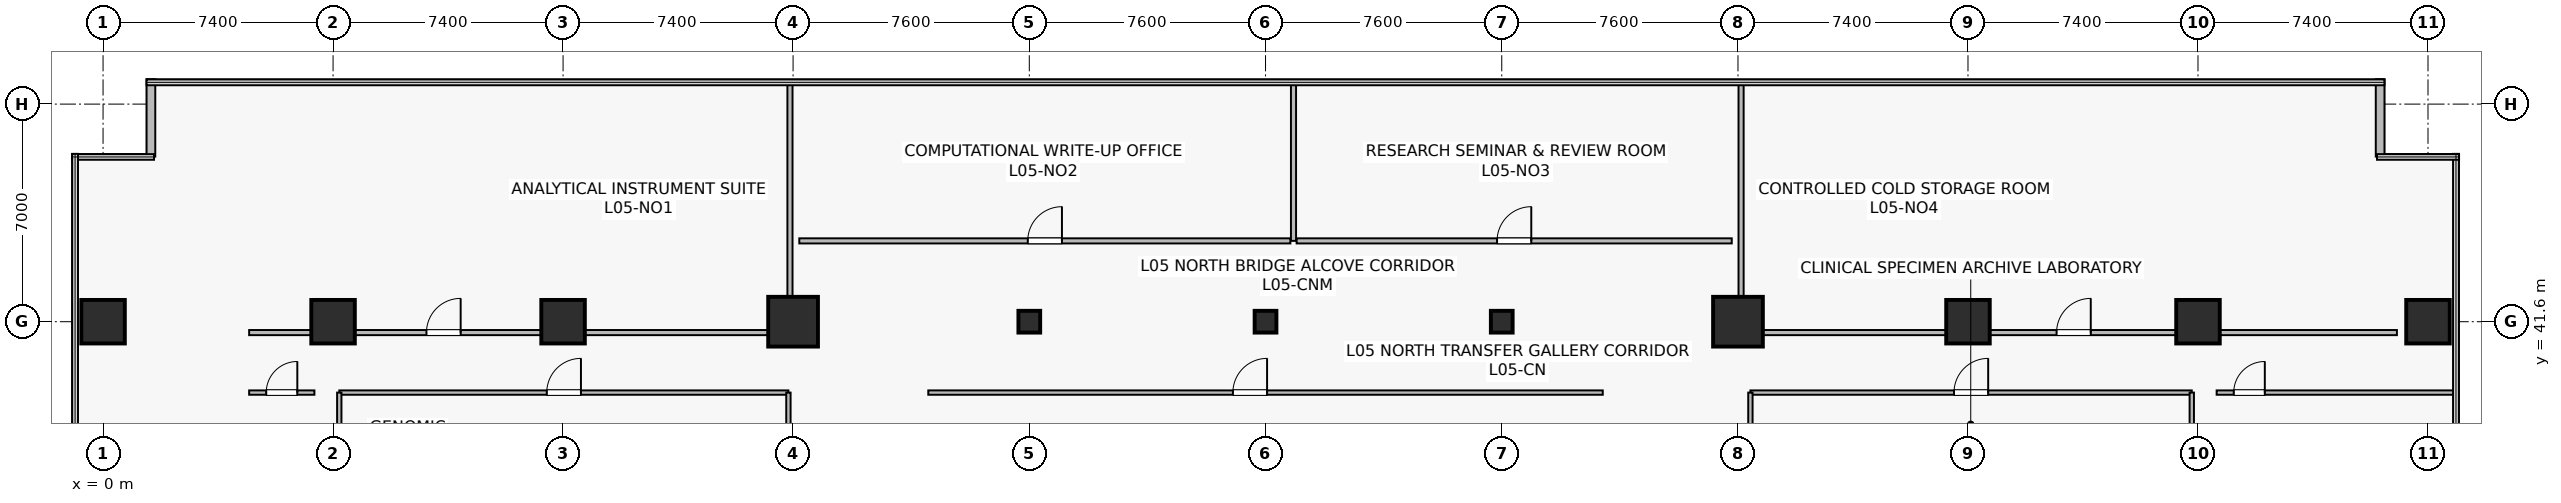
"""IFC4 building model, lengths in metres.
Left out: names, types, materials, properties, quantities, classifications, styles, units other than length and angle.
Written with IfcOpenShell. Run it as: python <this file> out.ifc"""

import sys

from ifc_helpers import new_model, si_unit, direction, frame, frame_2d, origin, origin_2d, place, context, subcontext, project, spatial, rectangle, hollow_rectangle, extrude, source, transform, mapped, element, fill, save


model = new_model("IFC4")
c1 = context("Model", 3, precision=1e-05, world=origin(), true_north=direction((0.0, 1.0)))
c2 = subcontext(c1, "Body", "Model", "MODEL_VIEW")
j1 = project(units=[si_unit("LENGTHUNIT", "METRE"), si_unit("PLANEANGLEUNIT", "RADIAN")], contexts=[c1])
p1 = place(None, origin())
s1 = spatial("IfcSite", under=j1, at=p1, CompositionType="ELEMENT")
p2 = place(p1, origin())
s2 = spatial("IfcBuilding", under=s1, at=p2, CompositionType="ELEMENT")
p3 = place(p2, frame((0.0, 0.0, 19.8)))
s3 = spatial("IfcBuildingStorey", under=s2, at=p3, CompositionType="ELEMENT", Elevation=19.8)
m1 = source(origin(), c2, "Body", "SweptSolid", [
    extrude(rectangle(XDim=1.4, YDim=1.4, at=origin_2d()), origin(), (0.0, 0.0, 1.0), 5.4),
])
p4 = place(p3, frame((14.8, 41.6, 0.0), z_axis=(0.0, 0.0, 1.0), x_axis=(1.0, 0.0, 0.0)))
e1 = element("IfcColumn", 1, at=p4, inside=s3, PredefinedType="COLUMN", context=c2, shape_type="MappedRepresentation", body=[
    mapped(m1, transform((0.0, 0.0, 0.0), scale=1.0)),
])
m2 = source(origin(), c2, "Body", "SweptSolid", [
    extrude(rectangle(XDim=1.6, YDim=1.6, at=origin_2d()), origin(), (0.0, 0.0, 1.0), 5.4),
])
for number, where, z_axis, x_axis in (
    (2, (22.2, 41.6, 0.0), (0.0, 0.0, 1.0), (1.0, 0.0, 0.0)),
    (3, (52.6, 41.6, 0.0), (0.0, 0.0, 1.0), (1.0, 0.0, 0.0)),
):
    element("IfcColumn", number, at=place(p3, frame(where, z_axis=z_axis, x_axis=x_axis)), inside=s3, PredefinedType="COLUMN", context=c2, shape_type="MappedRepresentation", body=[
        mapped(m2, transform((0.0, 0.0, 0.0), scale=1.0)),
    ])
for number, where, z_axis, x_axis in (
    (4, (60.0, 41.6, 0.0), (0.0, 0.0, 1.0), (1.0, 0.0, 0.0)),
    (5, (7.4, 41.6, 0.0), (0.0, 0.0, 1.0), (1.0, 0.0, 0.0)),
    (6, (67.4, 41.6, 0.0), (0.0, 0.0, 1.0), (1.0, 0.0, 0.0)),
    (7, (0.0, 41.6, 0.0), (0.0, 0.0, 1.0), (1.0, 0.0, 0.0)),
    (8, (74.8, 41.6, 0.0), (0.0, 0.0, 1.0), (1.0, 0.0, 0.0)),
):
    element("IfcColumn", number, at=place(p3, frame(where, z_axis=z_axis, x_axis=x_axis)), inside=s3, PredefinedType="COLUMN", context=c2, shape_type="MappedRepresentation", body=[
        mapped(m1, transform((0.0, 0.0, 0.0), scale=1.0)),
    ])
m3 = source(origin(), c2, "Body", "SweptSolid", [
    extrude(hollow_rectangle(XDim=0.7, YDim=0.7, WallThickness=0.032, at=origin_2d()), origin(), (0.0, 0.0, 1.0), 5.4),
])
for number, where, z_axis, x_axis in (
    (9, (29.8, 41.6, 0.0), (0.0, 0.0, 1.0), (1.0, 0.0, 0.0)),
    (10, (37.4, 41.6, 0.0), (0.0, 0.0, 1.0), (1.0, 0.0, 0.0)),
    (11, (45.0, 41.6, 0.0), (0.0, 0.0, 1.0), (1.0, 0.0, 0.0)),
):
    element("IfcColumn", number, at=place(p3, frame(where, z_axis=z_axis, x_axis=x_axis)), inside=s3, PredefinedType="COLUMN", context=c2, shape_type="MappedRepresentation", body=[
        mapped(m3, transform((0.0, 0.0, 0.0), scale=1.0)),
    ])
for number, where, z_axis, x_axis in (
    (12, (73.26, 46.912, 0.0), (0.0, 0.0, 1.0), (0.0, 1.0, 0.0)),
    (13, (1.54, 49.4, 0.0), (0.0, 0.0, 1.0), (0.0, -1.0, 0.0)),
):
    element("IfcWall", number, at=place(p3, frame(where, z_axis=z_axis, x_axis=x_axis)), inside=s3, PredefinedType="STANDARD", context=c2, shape_type="SweptSolid", body=[
        extrude(rectangle(XDim=2.488, YDim=0.28, at=frame_2d((1.244, 0.0))), origin(), (0.0, 0.0, 1.0), 5.08),
    ])
p5 = place(p3, frame((4.7, 41.25, 0.0), z_axis=(0.0, 0.0, 1.0), x_axis=(1.0, 0.0, 0.0)))
e14 = element("IfcWall", 14, at=p5, inside=s3, PredefinedType="PARTITIONING", context=c2, shape_type="SweptSolid", body=[
    extrude(rectangle(XDim=17.1, YDim=0.165, at=frame_2d((8.55, 0.0))), origin(), (0.0, 0.0, 1.0), 4.365),
])
p6 = place(p5, frame((5.705, 0.0, 0.0)))
e15 = element("IfcOpeningElement", 15, at=p6, cuts=e14, PredefinedType="OPENING", context=c2, shape_type="SweptSolid", body=[
    extrude(rectangle(XDim=1.1, YDim=2.18, at=frame_2d((0.55, 1.09))), frame((0.0, 0.093, 0.0), z_axis=(0.0, -1.0, 0.0), x_axis=(1.0, 0.0, 0.0)), (0.0, 0.0, 1.0), 0.185),
])
p7 = place(p3, frame((22.4, 44.2, 0.0), z_axis=(0.0, 0.0, 1.0), x_axis=(1.0, 0.0, 0.0)))
e16 = element("IfcWall", 16, at=p7, inside=s3, PredefinedType="PARTITIONING", context=c2, shape_type="SweptSolid", body=[
    extrude(rectangle(XDim=15.8, YDim=0.165, at=frame_2d((7.9, 0.0))), origin(), (0.0, 0.0, 1.0), 5.08),
])
p8 = place(p7, frame((7.35, 0.0, 0.0)))
e17 = element("IfcOpeningElement", 17, at=p8, cuts=e16, PredefinedType="OPENING", context=c2, shape_type="SweptSolid", body=[
    extrude(rectangle(XDim=1.1, YDim=2.18, at=frame_2d((0.55, 1.09))), frame((0.0, 0.093, 0.0), z_axis=(0.0, -1.0, 0.0), x_axis=(1.0, 0.0, 0.0)), (0.0, 0.0, 1.0), 0.185),
])
p9 = place(p3, frame((38.4, 44.2, 0.0), z_axis=(0.0, 0.0, 1.0), x_axis=(1.0, 0.0, 0.0)))
e18 = element("IfcWall", 18, at=p9, inside=s3, PredefinedType="PARTITIONING", context=c2, shape_type="SweptSolid", body=[
    extrude(rectangle(XDim=14.0, YDim=0.165, at=frame_2d((7.0, 0.0))), origin(), (0.0, 0.0, 1.0), 5.08),
])
p10 = place(p9, frame((6.45, 0.0, 0.0)))
e19 = element("IfcOpeningElement", 19, at=p10, cuts=e18, PredefinedType="OPENING", context=c2, shape_type="SweptSolid", body=[
    extrude(rectangle(XDim=1.1, YDim=2.18, at=frame_2d((0.55, 1.09))), frame((0.0, 0.093, 0.0), z_axis=(0.0, -1.0, 0.0), x_axis=(1.0, 0.0, 0.0)), (0.0, 0.0, 1.0), 0.185),
])
p11 = place(p3, frame((53.0, 41.25, 0.0), z_axis=(0.0, 0.0, 1.0), x_axis=(1.0, 0.0, 0.0)))
e20 = element("IfcWall", 20, at=p11, inside=s3, PredefinedType="PARTITIONING", context=c2, shape_type="SweptSolid", body=[
    extrude(rectangle(XDim=20.8, YDim=0.165, at=frame_2d((10.4, 0.0))), origin(), (0.0, 0.0, 1.0), 4.365),
])
p12 = place(p11, frame((9.85, 0.0, 0.0)))
e21 = element("IfcOpeningElement", 21, at=p12, cuts=e20, PredefinedType="OPENING", context=c2, shape_type="SweptSolid", body=[
    extrude(rectangle(XDim=1.1, YDim=2.18, at=frame_2d((0.55, 1.09))), frame((0.0, 0.093, 0.0), z_axis=(0.0, -1.0, 0.0), x_axis=(1.0, 0.0, 0.0)), (0.0, 0.0, 1.0), 0.185),
])
p13 = place(p3, frame((22.1, 41.25, 0.0), z_axis=(0.0, 0.0, 1.0), x_axis=(0.0, 1.0, 0.0)))
e22 = element("IfcWall", 22, at=p13, inside=s3, PredefinedType="PARTITIONING", context=c2, shape_type="SweptSolid", body=[
    extrude(rectangle(XDim=8.03, YDim=0.165, at=frame_2d((4.015, 0.0))), origin(), (0.0, 0.0, 1.0), 4.165),
])
p14 = place(p3, frame((38.3, 44.2, 0.0), z_axis=(0.0, 0.0, 1.0), x_axis=(0.0, 1.0, 0.0)))
e23 = element("IfcWall", 23, at=p14, inside=s3, PredefinedType="PARTITIONING", context=c2, shape_type="SweptSolid", body=[
    extrude(rectangle(XDim=5.08, YDim=0.165, at=frame_2d((2.54, 0.0))), origin(), (0.0, 0.0, 1.0), 5.08),
])
p15 = place(p3, frame((52.7, 41.25, 0.0), z_axis=(0.0, 0.0, 1.0), x_axis=(0.0, 1.0, 0.0)))
e24 = element("IfcWall", 24, at=p15, inside=s3, PredefinedType="PARTITIONING", context=c2, shape_type="SweptSolid", body=[
    extrude(rectangle(XDim=8.03, YDim=0.165, at=frame_2d((4.015, 0.0))), origin(), (0.0, 0.0, 1.0), 4.165),
])
p16 = place(p3, frame((7.6, 39.32, 0.0), z_axis=(0.0, 0.0, 1.0), x_axis=(1.0, 0.0, 0.0)))
e25 = element("IfcWall", 25, at=p16, inside=s3, PredefinedType="PARTITIONING", context=c2, shape_type="SweptSolid", body=[
    extrude(rectangle(XDim=14.45, YDim=0.14, at=frame_2d((7.225, 0.0))), origin(), (0.0, 0.0, 1.0), 4.365),
])
p17 = place(p16, frame((6.675, 0.0, 0.0)))
e26 = element("IfcOpeningElement", 26, at=p17, cuts=e25, PredefinedType="OPENING", context=c2, shape_type="SweptSolid", body=[
    extrude(rectangle(XDim=1.1, YDim=2.18, at=frame_2d((0.55, 1.09))), frame((0.0, 0.08, 0.0), z_axis=(0.0, -1.0, 0.0), x_axis=(1.0, 0.0, 0.0)), (0.0, 0.0, 1.0), 0.16),
])
for number, where, z_axis, x_axis in (
    (27, (7.6, 36.08, 0.0), (0.0, 0.0, 1.0), (0.0, 1.0, 0.0)),
    (28, (22.05, 36.08, 0.0), (0.0, 0.0, 1.0), (0.0, 1.0, 0.0)),
):
    element("IfcWall", number, at=place(p3, frame(where, z_axis=z_axis, x_axis=x_axis)), inside=s3, PredefinedType="PARTITIONING", context=c2, shape_type="SweptSolid", body=[
        extrude(rectangle(XDim=3.24, YDim=0.14, at=frame_2d((1.62, 0.0))), origin(), (0.0, 0.0, 1.0), 4.365),
    ])
p18 = place(p3, frame((53.0, 39.32, 0.0), z_axis=(0.0, 0.0, 1.0), x_axis=(1.0, 0.0, 0.0)))
e29 = element("IfcWall", 29, at=p18, inside=s3, PredefinedType="PARTITIONING", context=c2, shape_type="SweptSolid", body=[
    extrude(rectangle(XDim=14.2, YDim=0.14, at=frame_2d((7.1, 0.0))), origin(), (0.0, 0.0, 1.0), 4.365),
])
p19 = place(p18, frame((6.55, 0.0, 0.0)))
e30 = element("IfcOpeningElement", 30, at=p19, cuts=e29, PredefinedType="OPENING", context=c2, shape_type="SweptSolid", body=[
    extrude(rectangle(XDim=1.1, YDim=2.18, at=frame_2d((0.55, 1.09))), frame((0.0, 0.08, 0.0), z_axis=(0.0, -1.0, 0.0), x_axis=(1.0, 0.0, 0.0)), (0.0, 0.0, 1.0), 0.16),
])
p20 = place(p3, frame((53.0, 36.08, 0.0), z_axis=(0.0, 0.0, 1.0), x_axis=(0.0, 1.0, 0.0)))
e31 = element("IfcWall", 31, at=p20, inside=s3, PredefinedType="PARTITIONING", context=c2, shape_type="SweptSolid", body=[
    extrude(rectangle(XDim=3.24, YDim=0.14, at=frame_2d((1.62, 0.0))), origin(), (0.0, 0.0, 1.0), 5.08),
])
p21 = place(p3, frame((67.2, 36.08, 0.0), z_axis=(0.0, 0.0, 1.0), x_axis=(0.0, 1.0, 0.0)))
e32 = element("IfcWall", 32, at=p21, inside=s3, PredefinedType="PARTITIONING", context=c2, shape_type="SweptSolid", body=[
    extrude(rectangle(XDim=3.24, YDim=0.14, at=frame_2d((1.62, 0.0))), origin(), (0.0, 0.0, 1.0), 4.365),
])
p22 = place(p3, frame((26.55, 39.32, 0.0), z_axis=(0.0, 0.0, 1.0), x_axis=(1.0, 0.0, 0.0)))
e33 = element("IfcWall", 33, at=p22, inside=s3, PredefinedType="PARTITIONING", context=c2, shape_type="SweptSolid", body=[
    extrude(rectangle(XDim=21.7, YDim=0.14, at=frame_2d((10.85, 0.0))), origin(), (0.0, 0.0, 1.0), 4.365),
])
p23 = place(p22, frame((9.8, 0.0, 0.0)))
e34 = element("IfcOpeningElement", 34, at=p23, cuts=e33, PredefinedType="OPENING", context=c2, shape_type="SweptSolid", body=[
    extrude(rectangle(XDim=1.1, YDim=2.18, at=frame_2d((0.55, 1.09))), frame((0.0, 0.08, 0.0), z_axis=(0.0, -1.0, 0.0), x_axis=(1.0, 0.0, 0.0)), (0.0, 0.0, 1.0), 0.16),
])
p24 = place(p3, frame((4.7, 39.32, 0.0), z_axis=(0.0, 0.0, 1.0), x_axis=(1.0, 0.0, 0.0)))
e35 = element("IfcWall", 35, at=p24, inside=s3, PredefinedType="PARTITIONING", context=c2, shape_type="SweptSolid", body=[
    extrude(rectangle(XDim=2.1, YDim=0.14, at=frame_2d((1.05, 0.0))), origin(), (0.0, 0.0, 1.0), 5.08),
])
p25 = place(p24, frame((0.55, 0.0, 0.0)))
e36 = element("IfcOpeningElement", 36, at=p25, cuts=e35, PredefinedType="OPENING", context=c2, shape_type="SweptSolid", body=[
    extrude(rectangle(XDim=1.0, YDim=2.15, at=frame_2d((0.5, 1.075))), frame((0.0, 0.08, 0.0), z_axis=(0.0, -1.0, 0.0), x_axis=(1.0, 0.0, 0.0)), (0.0, 0.0, 1.0), 0.16),
])
p26 = place(p3, frame((68.0, 39.32, 0.0), z_axis=(0.0, 0.0, 1.0), x_axis=(1.0, 0.0, 0.0)))
e37 = element("IfcWall", 37, at=p26, inside=s3, PredefinedType="PARTITIONING", context=c2, shape_type="SweptSolid", body=[
    extrude(rectangle(XDim=7.65, YDim=0.14, at=frame_2d((3.825, 0.0))), origin(), (0.0, 0.0, 1.0), 4.465),
])
p27 = place(p26, frame((0.55, 0.0, 0.0)))
e38 = element("IfcOpeningElement", 38, at=p27, cuts=e37, PredefinedType="OPENING", context=c2, shape_type="SweptSolid", body=[
    extrude(rectangle(XDim=1.0, YDim=2.15, at=frame_2d((0.5, 1.075))), frame((0.0, 0.08, 0.0), z_axis=(0.0, -1.0, 0.0), x_axis=(1.0, 0.0, 0.0)), (0.0, 0.0, 1.0), 0.16),
])
m4 = source(origin(), c2, "Body", "SweptSolid", [
    extrude(rectangle(XDim=1.1, YDim=2.18, at=frame_2d((0.55, 1.09))), frame((0.0, 0.025, 0.0), z_axis=(0.0, -1.0, 0.0), x_axis=(1.0, 0.0, 0.0)), (0.0, 0.0, 1.0), 0.05),
])
p28 = place(p6, origin())
e39 = element("IfcDoor", 39, at=p28, inside=s3, OperationType="SINGLE_SWING_RIGHT", PredefinedType="DOOR", context=c2, shape_type="MappedRepresentation", body=[
    mapped(m4, transform((0.0, 0.0, 0.0), scale=1.0)),
])
fill(e15, e39)
p29 = place(p8, origin())
e40 = element("IfcDoor", 40, at=p29, inside=s3, OperationType="SINGLE_SWING_RIGHT", PredefinedType="DOOR", context=c2, shape_type="MappedRepresentation", body=[
    mapped(m4, transform((0.0, 0.0, 0.0), scale=1.0)),
])
fill(e17, e40)
p30 = place(p10, origin())
e41 = element("IfcDoor", 41, at=p30, inside=s3, OperationType="SINGLE_SWING_RIGHT", PredefinedType="DOOR", context=c2, shape_type="MappedRepresentation", body=[
    mapped(m4, transform((0.0, 0.0, 0.0), scale=1.0)),
])
fill(e19, e41)
p31 = place(p12, origin())
e42 = element("IfcDoor", 42, at=p31, inside=s3, OperationType="SINGLE_SWING_RIGHT", PredefinedType="DOOR", context=c2, shape_type="MappedRepresentation", body=[
    mapped(m4, transform((0.0, 0.0, 0.0), scale=1.0)),
])
fill(e21, e42)
p32 = place(p17, origin())
e43 = element("IfcDoor", 43, at=p32, inside=s3, OperationType="SINGLE_SWING_RIGHT", PredefinedType="DOOR", context=c2, shape_type="MappedRepresentation", body=[
    mapped(m4, transform((0.0, 0.0, 0.0), scale=1.0)),
])
fill(e26, e43)
p33 = place(p19, origin())
e44 = element("IfcDoor", 44, at=p33, inside=s3, OperationType="SINGLE_SWING_RIGHT", PredefinedType="DOOR", context=c2, shape_type="MappedRepresentation", body=[
    mapped(m4, transform((0.0, 0.0, 0.0), scale=1.0)),
])
fill(e30, e44)
p34 = place(p23, origin())
e45 = element("IfcDoor", 45, at=p34, inside=s3, OperationType="SINGLE_SWING_RIGHT", PredefinedType="DOOR", context=c2, shape_type="MappedRepresentation", body=[
    mapped(m4, transform((0.0, 0.0, 0.0), scale=1.0)),
])
fill(e34, e45)
m5 = source(origin(), c2, "Body", "SweptSolid", [
    extrude(rectangle(XDim=1.0, YDim=2.15, at=frame_2d((0.5, 1.075))), frame((0.0, 0.025, 0.0), z_axis=(0.0, -1.0, 0.0), x_axis=(1.0, 0.0, 0.0)), (0.0, 0.0, 1.0), 0.05),
])
p35 = place(p25, origin())
e46 = element("IfcDoor", 46, at=p35, inside=s3, OperationType="SINGLE_SWING_RIGHT", PredefinedType="DOOR", context=c2, shape_type="MappedRepresentation", body=[
    mapped(m5, transform((0.0, 0.0, 0.0), scale=1.0)),
])
fill(e36, e46)
p36 = place(p27, origin())
e47 = element("IfcDoor", 47, at=p36, inside=s3, OperationType="SINGLE_SWING_RIGHT", PredefinedType="DOOR", context=c2, shape_type="MappedRepresentation", body=[
    mapped(m5, transform((0.0, 0.0, 0.0), scale=1.0)),
])
fill(e38, e47)
save(model, sys.argv[1])
